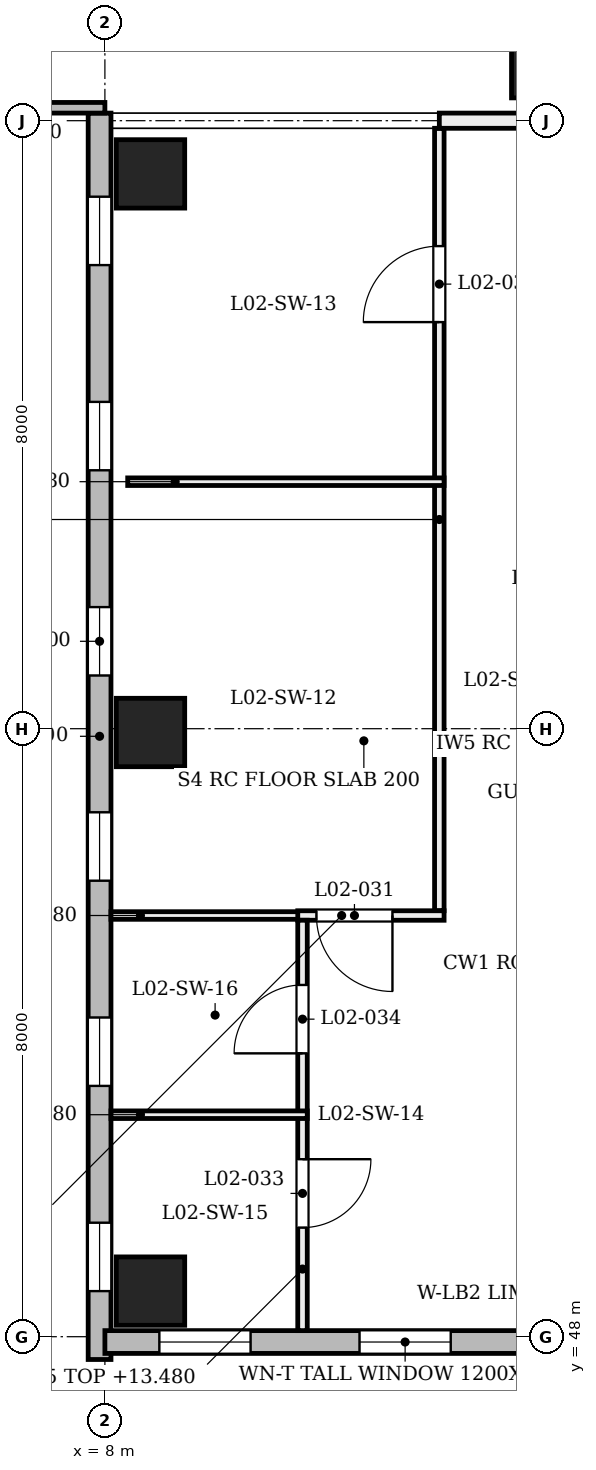
"""IFC4 building model, lengths in metres.
Left out: names, types, materials, properties, quantities, classifications, styles, units other than length and angle.
Written with IfcOpenShell. Run it as: python <this file> out.ifc"""

import sys

from ifc_helpers import new_model, si_unit, direction, frame, frame_2d, origin, origin_2d, place, context, subcontext, project, spatial, rectangle, extrude, element, fill, save


model = new_model("IFC4")
c1 = context("Model", 3, precision=1e-05, world=origin(), true_north=direction((0.0, 1.0)))
c2 = subcontext(c1, "Body", "Model", "MODEL_VIEW")
j1 = project(units=[si_unit("LENGTHUNIT", "METRE"), si_unit("PLANEANGLEUNIT", "RADIAN")], contexts=[c1])
p1 = place(None, origin())
s1 = spatial("IfcSite", under=j1, at=p1, CompositionType="ELEMENT")
p2 = place(p1, origin())
s2 = spatial("IfcBuilding", under=s1, at=p2, CompositionType="ELEMENT")
p3 = place(p2, frame((0.0, 0.0, 9.6)))
s3 = spatial("IfcBuildingStorey", under=s2, at=p3, CompositionType="ELEMENT", Elevation=9.6)
for number, where, z_axis, x_axis in (
    (1, (8.6, 48.6, 0.0), (0.0, 0.0, 1.0), (1.0, 0.0, 0.0)),
    (2, (8.6, 55.95, 0.0), (0.0, 0.0, 1.0), (1.0, 0.0, 0.0)),
    (3, (8.6, 63.3, 0.0), (0.0, 0.0, 1.0), (1.0, 0.0, 0.0)),
):
    element("IfcColumn", number, at=place(p3, frame(where, z_axis=z_axis, x_axis=x_axis)), inside=s3, PredefinedType="COLUMN", context=c2, shape_type="SweptSolid", body=[
        extrude(rectangle(XDim=0.9, YDim=0.9, at=origin_2d()), origin(), (0.0, 0.0, 1.0), 4.8),
    ])
p4 = place(p3, frame((14.0, 64.7, 0.0), z_axis=(-0.203962208122, 0.0, 0.978978762618), x_axis=(0.0, -1.0, 0.0)))
e4 = element("IfcColumn", 4, at=p4, inside=s3, PredefinedType="COLUMN", context=c2, shape_type="SweptSolid", body=[
    extrude(rectangle(XDim=0.8, YDim=0.8, at=origin_2d()), origin(), (0.0, 0.0, 1.0), 4.903),
])
p5 = place(p3, frame((7.93, 47.7, 0.0), z_axis=(0.0, 0.0, 1.0), x_axis=(0.0, 1.0, 0.0)))
e5 = element("IfcWall", 5, at=p5, inside=s3, PredefinedType="SOLIDWALL", context=c2, shape_type="SweptSolid", body=[
    extrude(rectangle(XDim=16.4, YDim=0.3, at=frame_2d((8.2, 0.0))), origin(), (0.0, 0.0, 1.0), 3.9),
])
p6 = place(p5, frame((0.9, 0.0, 0.75)))
e6 = element("IfcOpeningElement", 6, at=p6, cuts=e5, PredefinedType="OPENING", context=c2, shape_type="SweptSolid", body=[
    extrude(rectangle(XDim=0.9, YDim=3.1, at=frame_2d((0.45, 1.55))), frame((0.0, 0.16, 0.0), z_axis=(0.0, -1.0, 0.0), x_axis=(1.0, 0.0, 0.0)), (0.0, 0.0, 1.0), 0.32),
])
p7 = place(p5, frame((3.6, 0.0, 0.75)))
e7 = element("IfcOpeningElement", 7, at=p7, cuts=e5, PredefinedType="OPENING", context=c2, shape_type="SweptSolid", body=[
    extrude(rectangle(XDim=0.9, YDim=3.1, at=frame_2d((0.45, 1.55))), frame((0.0, 0.16, 0.0), z_axis=(0.0, -1.0, 0.0), x_axis=(1.0, 0.0, 0.0)), (0.0, 0.0, 1.0), 0.32),
])
p8 = place(p5, frame((6.3, 0.0, 0.75)))
e8 = element("IfcOpeningElement", 8, at=p8, cuts=e5, PredefinedType="OPENING", context=c2, shape_type="SweptSolid", body=[
    extrude(rectangle(XDim=0.9, YDim=3.1, at=frame_2d((0.45, 1.55))), frame((0.0, 0.16, 0.0), z_axis=(0.0, -1.0, 0.0), x_axis=(1.0, 0.0, 0.0)), (0.0, 0.0, 1.0), 0.32),
])
p9 = place(p5, frame((9.0, 0.0, 0.75)))
e9 = element("IfcOpeningElement", 9, at=p9, cuts=e5, PredefinedType="OPENING", context=c2, shape_type="SweptSolid", body=[
    extrude(rectangle(XDim=0.9, YDim=3.1, at=frame_2d((0.45, 1.55))), frame((0.0, 0.16, 0.0), z_axis=(0.0, -1.0, 0.0), x_axis=(1.0, 0.0, 0.0)), (0.0, 0.0, 1.0), 0.32),
])
p10 = place(p5, frame((11.7, 0.0, 0.75)))
e10 = element("IfcOpeningElement", 10, at=p10, cuts=e5, PredefinedType="OPENING", context=c2, shape_type="SweptSolid", body=[
    extrude(rectangle(XDim=0.9, YDim=3.1, at=frame_2d((0.45, 1.55))), frame((0.0, 0.16, 0.0), z_axis=(0.0, -1.0, 0.0), x_axis=(1.0, 0.0, 0.0)), (0.0, 0.0, 1.0), 0.32),
])
p11 = place(p5, frame((14.4, 0.0, 0.75)))
e11 = element("IfcOpeningElement", 11, at=p11, cuts=e5, PredefinedType="OPENING", context=c2, shape_type="SweptSolid", body=[
    extrude(rectangle(XDim=0.9, YDim=3.1, at=frame_2d((0.45, 1.55))), frame((0.0, 0.16, 0.0), z_axis=(0.0, -1.0, 0.0), x_axis=(1.0, 0.0, 0.0)), (0.0, 0.0, 1.0), 0.32),
])
p12 = place(p3, frame((8.0, 47.93, 0.0), z_axis=(0.0, 0.0, 1.0), x_axis=(1.0, 0.0, 0.0)))
e12 = element("IfcWall", 12, at=p12, inside=s3, PredefinedType="SOLIDWALL", context=c2, shape_type="SweptSolid", body=[
    extrude(rectangle(XDim=7.9, YDim=0.3, at=frame_2d((3.95, 0.0))), origin(), (0.0, 0.0, 1.0), 3.9),
])
p13 = place(p12, frame((0.717, 0.0, 0.75)))
e13 = element("IfcOpeningElement", 13, at=p13, cuts=e12, PredefinedType="OPENING", context=c2, shape_type="SweptSolid", body=[
    extrude(rectangle(XDim=1.2, YDim=3.1, at=frame_2d((0.6, 1.55))), frame((0.0, 0.16, 0.0), z_axis=(0.0, -1.0, 0.0), x_axis=(1.0, 0.0, 0.0)), (0.0, 0.0, 1.0), 0.32),
])
p14 = place(p12, frame((3.35, 0.0, 0.75)))
e14 = element("IfcOpeningElement", 14, at=p14, cuts=e12, PredefinedType="OPENING", context=c2, shape_type="SweptSolid", body=[
    extrude(rectangle(XDim=1.2, YDim=3.1, at=frame_2d((0.6, 1.55))), frame((0.0, 0.16, 0.0), z_axis=(0.0, -1.0, 0.0), x_axis=(1.0, 0.0, 0.0)), (0.0, 0.0, 1.0), 0.32),
])
p15 = place(p12, frame((5.983, 0.0, 0.75)))
e15 = element("IfcOpeningElement", 15, at=p15, cuts=e12, PredefinedType="OPENING", context=c2, shape_type="SweptSolid", body=[
    extrude(rectangle(XDim=1.2, YDim=3.1, at=frame_2d((0.6, 1.55))), frame((0.0, 0.16, 0.0), z_axis=(0.0, -1.0, 0.0), x_axis=(1.0, 0.0, 0.0)), (0.0, 0.0, 1.0), 0.32),
])
p16 = place(p3, frame((6.0, 64.17, 0.0), z_axis=(0.0, 0.0, 1.0), x_axis=(1.0, 0.0, 0.0)))
e16 = element("IfcWall", 16, at=p16, inside=s3, PredefinedType="SOLIDWALL", context=c2, shape_type="SweptSolid", body=[
    extrude(rectangle(XDim=2.0, YDim=0.14, at=frame_2d((1.0, 0.0))), origin(), (0.0, 0.0, 1.0), 3.9),
])
p17 = place(p3, frame((12.4, 53.605, 0.0), z_axis=(0.0, 0.0, 1.0), x_axis=(0.0, 1.0, 0.0)))
e17 = element("IfcWall", 17, at=p17, inside=s3, PredefinedType="PARTITIONING", context=c2, shape_type="SweptSolid", body=[
    extrude(rectangle(XDim=10.295, YDim=0.125, at=frame_2d((5.147, 0.0))), origin(), (0.0, 0.0, 1.0), 3.88),
])
p18 = place(p17, frame((7.745, 0.0, 0.0)))
e18 = element("IfcOpeningElement", 18, at=p18, cuts=e17, PredefinedType="OPENING", context=c2, shape_type="SweptSolid", body=[
    extrude(rectangle(XDim=1.0, YDim=2.1, at=frame_2d((0.5, 1.05))), frame((0.0, 0.073, 0.0), z_axis=(0.0, -1.0, 0.0), x_axis=(1.0, 0.0, 0.0)), (0.0, 0.0, 1.0), 0.145),
])
p19 = place(p3, frame((8.08, 53.542, 0.0), z_axis=(0.0, 0.0, 1.0), x_axis=(1.0, 0.0, 0.0)))
e19 = element("IfcWall", 19, at=p19, inside=s3, PredefinedType="PARTITIONING", context=c2, shape_type="SweptSolid", body=[
    extrude(rectangle(XDim=2.583, YDim=0.1, at=frame_2d((1.291, 0.0))), origin(), (0.0, 0.0, 1.0), 3.88),
])
p20 = place(p3, frame((10.538, 53.542, 0.0), z_axis=(0.0, 0.0, 1.0), x_axis=(1.0, 0.0, 0.0)))
e20 = element("IfcWall", 20, at=p20, inside=s3, PredefinedType="PARTITIONING", context=c2, shape_type="SweptSolid", body=[
    extrude(rectangle(XDim=1.925, YDim=0.125, at=frame_2d((0.962, 0.0))), origin(), (0.0, 0.0, 1.0), 4.56),
])
p21 = place(p20, frame((0.246, 0.0, 0.0)))
e21 = element("IfcOpeningElement", 21, at=p21, cuts=e20, PredefinedType="OPENING", context=c2, shape_type="SweptSolid", body=[
    extrude(rectangle(XDim=1.0, YDim=2.1, at=frame_2d((0.5, 1.05))), frame((0.0, 0.073, 0.0), z_axis=(0.0, -1.0, 0.0), x_axis=(1.0, 0.0, 0.0)), (0.0, 0.0, 1.0), 0.145),
])
p22 = place(p3, frame((8.3, 59.25, 0.0), z_axis=(0.0, 0.0, 1.0), x_axis=(1.0, 0.0, 0.0)))
e22 = element("IfcWall", 22, at=p22, inside=s3, PredefinedType="PARTITIONING", context=c2, shape_type="SweptSolid", body=[
    extrude(rectangle(XDim=4.162, YDim=0.1, at=frame_2d((2.081, 0.0))), origin(), (0.0, 0.0, 1.0), 3.98),
])
p23 = place(p3, frame((10.6, 48.08, 0.0), z_axis=(0.0, 0.0, 1.0), x_axis=(0.0, 1.0, 0.0)))
e23 = element("IfcWall", 23, at=p23, inside=s3, PredefinedType="PARTITIONING", context=c2, shape_type="SweptSolid", body=[
    extrude(rectangle(XDim=5.4, YDim=0.125, at=frame_2d((2.7, 0.0))), origin(), (0.0, 0.0, 1.0), 3.88),
])
p24 = place(p23, frame((1.355, 0.0, 0.0)))
e24 = element("IfcOpeningElement", 24, at=p24, cuts=e23, PredefinedType="OPENING", context=c2, shape_type="SweptSolid", body=[
    extrude(rectangle(XDim=0.9, YDim=2.1, at=frame_2d((0.45, 1.05))), frame((0.0, 0.073, 0.0), z_axis=(0.0, -1.0, 0.0), x_axis=(1.0, 0.0, 0.0)), (0.0, 0.0, 1.0), 0.145),
])
p25 = place(p23, frame((3.648, 0.0, 0.0)))
e25 = element("IfcOpeningElement", 25, at=p25, cuts=e23, PredefinedType="OPENING", context=c2, shape_type="SweptSolid", body=[
    extrude(rectangle(XDim=0.9, YDim=2.1, at=frame_2d((0.45, 1.05))), frame((0.0, 0.073, 0.0), z_axis=(0.0, -1.0, 0.0), x_axis=(1.0, 0.0, 0.0)), (0.0, 0.0, 1.0), 0.145),
])
p26 = place(p3, frame((8.08, 50.921, 0.0), z_axis=(0.0, 0.0, 1.0), x_axis=(1.0, 0.0, 0.0)))
e26 = element("IfcWall", 26, at=p26, inside=s3, PredefinedType="PARTITIONING", context=c2, shape_type="SweptSolid", body=[
    extrude(rectangle(XDim=2.583, YDim=0.1, at=frame_2d((1.291, 0.0))), origin(), (0.0, 0.0, 1.0), 3.88),
])
p27 = place(p3, frame((12.4, 64.0, 0.0), z_axis=(0.0, 0.0, 1.0), x_axis=(1.0, 0.0, 0.0)))
e27 = element("IfcWall", 27, at=p27, inside=s3, PredefinedType="PARTITIONING", context=c2, shape_type="SweptSolid", body=[
    extrude(rectangle(XDim=3.6, YDim=0.2, at=frame_2d((1.8, 0.0))), origin(), (0.0, 0.0, 1.0), 3.88),
])
p28 = place(p27, frame((1.8, 0.0, 0.0)))
e28 = element("IfcOpeningElement", 28, at=p28, cuts=e27, PredefinedType="OPENING", context=c2, shape_type="SweptSolid", body=[
    extrude(rectangle(XDim=0.9, YDim=2.1, at=frame_2d((0.45, 1.05))), frame((0.0, 0.11, 0.0), z_axis=(0.0, -1.0, 0.0), x_axis=(1.0, 0.0, 0.0)), (0.0, 0.0, 1.0), 0.22),
])
p29 = place(p6, origin())
e29 = element("IfcWindow", 29, at=p29, inside=s3, PartitioningType="SINGLE_PANEL", PredefinedType="WINDOW", context=c2, shape_type="SweptSolid", body=[
    extrude(rectangle(XDim=0.9, YDim=3.1, at=frame_2d((0.45, 1.55))), frame((0.0, 0.03, 0.0), z_axis=(0.0, -1.0, 0.0), x_axis=(1.0, 0.0, 0.0)), (0.0, 0.0, 1.0), 0.06),
])
fill(e6, e29)
p30 = place(p7, origin())
e30 = element("IfcWindow", 30, at=p30, inside=s3, PartitioningType="SINGLE_PANEL", PredefinedType="WINDOW", context=c2, shape_type="SweptSolid", body=[
    extrude(rectangle(XDim=0.9, YDim=3.1, at=frame_2d((0.45, 1.55))), frame((0.0, 0.03, 0.0), z_axis=(0.0, -1.0, 0.0), x_axis=(1.0, 0.0, 0.0)), (0.0, 0.0, 1.0), 0.06),
])
fill(e7, e30)
p31 = place(p8, origin())
e31 = element("IfcWindow", 31, at=p31, inside=s3, PartitioningType="SINGLE_PANEL", PredefinedType="WINDOW", context=c2, shape_type="SweptSolid", body=[
    extrude(rectangle(XDim=0.9, YDim=3.1, at=frame_2d((0.45, 1.55))), frame((0.0, 0.03, 0.0), z_axis=(0.0, -1.0, 0.0), x_axis=(1.0, 0.0, 0.0)), (0.0, 0.0, 1.0), 0.06),
])
fill(e8, e31)
p32 = place(p9, origin())
e32 = element("IfcWindow", 32, at=p32, inside=s3, PartitioningType="SINGLE_PANEL", PredefinedType="WINDOW", context=c2, shape_type="SweptSolid", body=[
    extrude(rectangle(XDim=0.9, YDim=3.1, at=frame_2d((0.45, 1.55))), frame((0.0, 0.03, 0.0), z_axis=(0.0, -1.0, 0.0), x_axis=(1.0, 0.0, 0.0)), (0.0, 0.0, 1.0), 0.06),
])
fill(e9, e32)
p33 = place(p10, origin())
e33 = element("IfcWindow", 33, at=p33, inside=s3, PartitioningType="SINGLE_PANEL", PredefinedType="WINDOW", context=c2, shape_type="SweptSolid", body=[
    extrude(rectangle(XDim=0.9, YDim=3.1, at=frame_2d((0.45, 1.55))), frame((0.0, 0.03, 0.0), z_axis=(0.0, -1.0, 0.0), x_axis=(1.0, 0.0, 0.0)), (0.0, 0.0, 1.0), 0.06),
])
fill(e10, e33)
p34 = place(p11, origin())
e34 = element("IfcWindow", 34, at=p34, inside=s3, PartitioningType="SINGLE_PANEL", PredefinedType="WINDOW", context=c2, shape_type="SweptSolid", body=[
    extrude(rectangle(XDim=0.9, YDim=3.1, at=frame_2d((0.45, 1.55))), frame((0.0, 0.03, 0.0), z_axis=(0.0, -1.0, 0.0), x_axis=(1.0, 0.0, 0.0)), (0.0, 0.0, 1.0), 0.06),
])
fill(e11, e34)
p35 = place(p13, origin())
e35 = element("IfcWindow", 35, at=p35, inside=s3, PartitioningType="SINGLE_PANEL", PredefinedType="WINDOW", context=c2, shape_type="SweptSolid", body=[
    extrude(rectangle(XDim=1.2, YDim=3.1, at=frame_2d((0.6, 1.55))), frame((0.0, 0.03, 0.0), z_axis=(0.0, -1.0, 0.0), x_axis=(1.0, 0.0, 0.0)), (0.0, 0.0, 1.0), 0.06),
])
fill(e13, e35)
p36 = place(p14, origin())
e36 = element("IfcWindow", 36, at=p36, inside=s3, PartitioningType="SINGLE_PANEL", PredefinedType="WINDOW", context=c2, shape_type="SweptSolid", body=[
    extrude(rectangle(XDim=1.2, YDim=3.1, at=frame_2d((0.6, 1.55))), frame((0.0, 0.03, 0.0), z_axis=(0.0, -1.0, 0.0), x_axis=(1.0, 0.0, 0.0)), (0.0, 0.0, 1.0), 0.06),
])
fill(e14, e36)
p37 = place(p21, origin())
e37 = element("IfcDoor", 37, at=p37, inside=s3, OperationType="SINGLE_SWING_RIGHT", PredefinedType="DOOR", context=c2, shape_type="SweptSolid", body=[
    extrude(rectangle(XDim=1.0, YDim=2.1, at=frame_2d((0.5, 1.05))), frame((0.0, 0.025, 0.0), z_axis=(0.0, -1.0, 0.0), x_axis=(1.0, 0.0, 0.0)), (0.0, 0.0, 1.0), 0.05),
])
fill(e21, e37)
p38 = place(p18, origin())
e38 = element("IfcDoor", 38, at=p38, inside=s3, OperationType="SINGLE_SWING_LEFT", PredefinedType="DOOR", context=c2, shape_type="SweptSolid", body=[
    extrude(rectangle(XDim=1.0, YDim=2.1, at=frame_2d((0.5, 1.05))), frame((0.0, 0.025, 0.0), z_axis=(0.0, -1.0, 0.0), x_axis=(1.0, 0.0, 0.0)), (0.0, 0.0, 1.0), 0.05),
])
fill(e18, e38)
p39 = place(p24, origin())
e39 = element("IfcDoor", 39, at=p39, inside=s3, OperationType="SINGLE_SWING_RIGHT", PredefinedType="DOOR", context=c2, shape_type="SweptSolid", body=[
    extrude(rectangle(XDim=0.9, YDim=2.1, at=frame_2d((0.45, 1.05))), frame((0.0, 0.025, 0.0), z_axis=(0.0, -1.0, 0.0), x_axis=(1.0, 0.0, 0.0)), (0.0, 0.0, 1.0), 0.05),
])
fill(e24, e39)
p40 = place(p25, origin())
e40 = element("IfcDoor", 40, at=p40, inside=s3, OperationType="SINGLE_SWING_LEFT", PredefinedType="DOOR", context=c2, shape_type="SweptSolid", body=[
    extrude(rectangle(XDim=0.9, YDim=2.1, at=frame_2d((0.45, 1.05))), frame((0.0, 0.025, 0.0), z_axis=(0.0, -1.0, 0.0), x_axis=(1.0, 0.0, 0.0)), (0.0, 0.0, 1.0), 0.05),
])
fill(e25, e40)
save(model, sys.argv[1])
